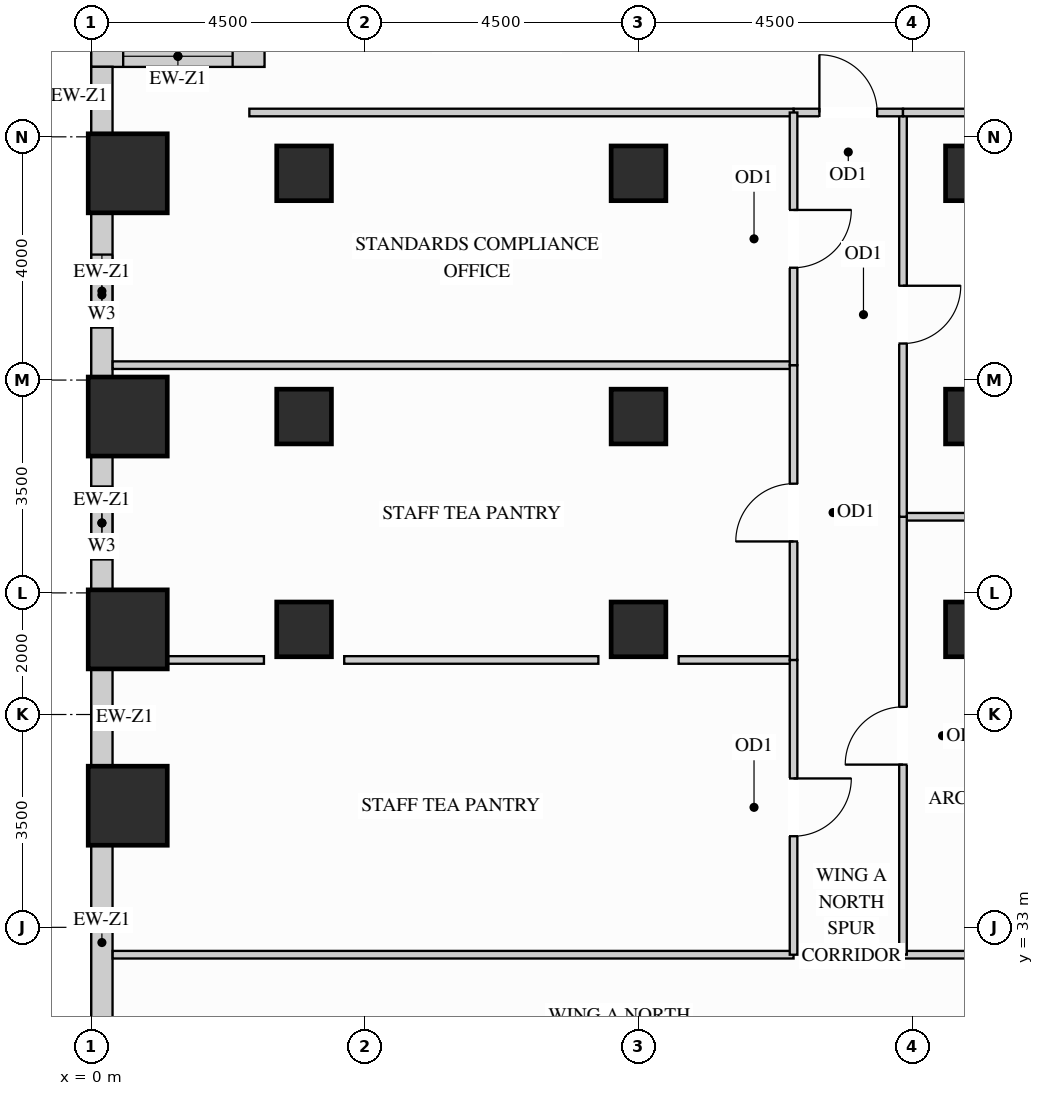
"""IFC4 building model, lengths in metres.
Left out: names, types, materials, properties, quantities, classifications, styles, units other than length and angle.
Written with IfcOpenShell. Run it as: python <this file> out.ifc"""

import sys

from ifc_helpers import new_model, si_unit, direction, frame, frame_2d, origin, origin_2d, place, context, subcontext, project, spatial, rectangle, extrude, source, transform, mapped, element, fill, save


model = new_model("IFC4")
c1 = context("Model", 3, precision=1e-05, world=origin(), true_north=direction((0.0, 1.0)))
c2 = subcontext(c1, "Body", "Model", "MODEL_VIEW")
j1 = project(units=[si_unit("LENGTHUNIT", "METRE"), si_unit("PLANEANGLEUNIT", "RADIAN")], contexts=[c1])
p1 = place(None, origin())
s1 = spatial("IfcSite", under=j1, at=p1, CompositionType="ELEMENT")
p2 = place(p1, origin())
s2 = spatial("IfcBuilding", under=s1, at=p2, CompositionType="ELEMENT")
p3 = place(p2, frame((0.0, 0.0, 47.7)))
s3 = spatial("IfcBuildingStorey", under=s2, at=p3, CompositionType="ELEMENT", Elevation=47.7)
m1 = source(origin(), c2, "Body", "SweptSolid", [
    extrude(rectangle(XDim=0.9, YDim=0.9, at=origin_2d()), origin(), (0.0, 0.0, 1.0), 3.38),
])
for number, where, z_axis, x_axis in (
    (1, (14.5, 37.9, 0.0), (0.0, 0.0, 1.0), (1.0, 0.0, 0.0)),
    (2, (14.5, 41.4, 0.0), (0.0, 0.0, 1.0), (1.0, 0.0, 0.0)),
    (3, (14.5, 45.4, 0.0), (0.0, 0.0, 1.0), (1.0, 0.0, 0.0)),
    (4, (3.5, 37.9, 0.0), (0.0, 0.0, 1.0), (1.0, 0.0, 0.0)),
    (5, (3.5, 41.4, 0.0), (0.0, 0.0, 1.0), (1.0, 0.0, 0.0)),
    (6, (3.5, 45.4, 0.0), (0.0, 0.0, 1.0), (1.0, 0.0, 0.0)),
    (7, (9.0, 37.9, 0.0), (0.0, 0.0, 1.0), (1.0, 0.0, 0.0)),
    (8, (9.0, 41.4, 0.0), (0.0, 0.0, 1.0), (1.0, 0.0, 0.0)),
    (9, (9.0, 45.4, 0.0), (0.0, 0.0, 1.0), (1.0, 0.0, 0.0)),
):
    element("IfcColumn", number, at=place(p3, frame(where, z_axis=z_axis, x_axis=x_axis)), inside=s3, PredefinedType="COLUMN", context=c2, shape_type="MappedRepresentation", body=[
        mapped(m1, transform((0.0, 0.0, 0.0), x_axis=(1.0, 0.0, 0.0), y_axis=(0.0, 1.0, 0.0), z_axis=(0.0, 0.0, 1.0))),
    ])
m2 = source(origin(), c2, "Body", "SweptSolid", [
    extrude(rectangle(XDim=1.3, YDim=1.3, at=origin_2d()), origin(), (0.0, 0.0, 1.0), 3.38),
])
for number, where, z_axis, x_axis in (
    (10, (0.6, 35.0, 0.0), (0.0, 0.0, 1.0), (1.0, 0.0, 0.0)),
    (11, (0.6, 37.9, 0.0), (0.0, 0.0, 1.0), (1.0, 0.0, 0.0)),
    (12, (0.6, 41.4, 0.0), (0.0, 0.0, 1.0), (1.0, 0.0, 0.0)),
    (13, (0.6, 45.4, 0.0), (0.0, 0.0, 1.0), (1.0, 0.0, 0.0)),
):
    element("IfcColumn", number, at=place(p3, frame(where, z_axis=z_axis, x_axis=x_axis)), inside=s3, PredefinedType="COLUMN", context=c2, shape_type="MappedRepresentation", body=[
        mapped(m2, transform((0.0, 0.0, 0.0), x_axis=(1.0, 0.0, 0.0), y_axis=(0.0, 1.0, 0.0), z_axis=(0.0, 0.0, 1.0))),
    ])
p4 = place(p3, frame((2.85, 47.325, 0.0), z_axis=(0.0, 0.0, 1.0), x_axis=(-1.0, 0.0, 0.0)))
e14 = element("IfcWall", 14, at=p4, inside=s3, PredefinedType="SOLIDWALL", context=c2, shape_type="SweptSolid", body=[
    extrude(rectangle(XDim=2.85, YDim=0.35, at=frame_2d((1.425, 0.0))), origin(), (0.0, 0.0, 1.0), 3.365),
])
p5 = place(p4, frame((0.525, 0.0, 0.78)))
e15 = element("IfcOpeningElement", 15, at=p5, cuts=e14, PredefinedType="OPENING", context=c2, shape_type="SweptSolid", body=[
    extrude(rectangle(XDim=1.8, YDim=2.1, at=frame_2d((0.9, 1.05))), frame((0.0, 0.185, 0.0), z_axis=(0.0, -1.0, 0.0), x_axis=(1.0, 0.0, 0.0)), (0.0, 0.0, 1.0), 0.37),
])
m3 = source(origin(), c2, "Body", "SweptSolid", [
    extrude(rectangle(XDim=1.104, YDim=0.35, at=frame_2d((0.552, 0.0))), origin(), (0.0, 0.0, 1.0), 3.365),
])
p6 = place(p3, frame((0.175, 47.152, 0.0), z_axis=(0.0, 0.0, 1.0), x_axis=(0.0, -1.0, 0.0)))
e16 = element("IfcWall", 16, at=p6, inside=s3, PredefinedType="SOLIDWALL", context=c2, shape_type="MappedRepresentation", body=[
    mapped(m3, transform((0.0, 0.0, 0.0), x_axis=(1.0, 0.0, 0.0), y_axis=(0.0, 1.0, 0.0), z_axis=(0.0, 0.0, 1.0))),
])
p7 = place(p3, frame((0.175, 44.752, 0.0), z_axis=(0.0, 0.0, 1.0), x_axis=(0.0, -1.0, 0.0)))
e17 = element("IfcWall", 17, at=p7, inside=s3, PredefinedType="SOLIDWALL", context=c2, shape_type="SweptSolid", body=[
    extrude(rectangle(XDim=2.704, YDim=0.35, at=frame_2d((1.352, 0.0))), origin(), (0.0, 0.0, 1.0), 2.51),
])
p8 = place(p7, frame((0.688, 0.0, 0.78)))
e18 = element("IfcOpeningElement", 18, at=p8, cuts=e17, PredefinedType="OPENING", context=c2, shape_type="SweptSolid", body=[
    extrude(rectangle(XDim=1.2, YDim=1.55, at=frame_2d((0.6, 0.775))), frame((0.0, 0.185, 0.0), z_axis=(0.0, -1.0, 0.0), x_axis=(1.0, 0.0, 0.0)), (0.0, 0.0, 1.0), 0.37),
])
p9 = place(p3, frame((0.175, 40.752, 0.0), z_axis=(0.0, 0.0, 1.0), x_axis=(0.0, -1.0, 0.0)))
e19 = element("IfcWall", 19, at=p9, inside=s3, PredefinedType="SOLIDWALL", context=c2, shape_type="SweptSolid", body=[
    extrude(rectangle(XDim=2.204, YDim=0.35, at=frame_2d((1.102, 0.0))), origin(), (0.0, 0.0, 1.0), 2.51),
])
p10 = place(p9, frame((0.502, 0.0, 0.78)))
e20 = element("IfcOpeningElement", 20, at=p10, cuts=e19, PredefinedType="OPENING", context=c2, shape_type="SweptSolid", body=[
    extrude(rectangle(XDim=1.2, YDim=1.55, at=frame_2d((0.6, 0.775))), frame((0.0, 0.185, 0.0), z_axis=(0.0, -1.0, 0.0), x_axis=(1.0, 0.0, 0.0)), (0.0, 0.0, 1.0), 0.37),
])
m4 = source(origin(), c2, "Body", "SweptSolid", [
    extrude(rectangle(XDim=1.604, YDim=0.35, at=frame_2d((0.802, 0.0))), origin(), (0.0, 0.0, 1.0), 2.51),
])
p11 = place(p3, frame((0.175, 37.252, 0.0), z_axis=(0.0, 0.0, 1.0), x_axis=(0.0, -1.0, 0.0)))
e21 = element("IfcWall", 21, at=p11, inside=s3, PredefinedType="SOLIDWALL", context=c2, shape_type="MappedRepresentation", body=[
    mapped(m4, transform((0.0, 0.0, 0.0), x_axis=(1.0, 0.0, 0.0), y_axis=(0.0, 1.0, 0.0), z_axis=(0.0, 0.0, 1.0))),
])
m5 = source(origin(), c2, "Body", "SweptSolid", [
    extrude(rectangle(XDim=3.204, YDim=0.35, at=frame_2d((1.602, 0.0))), origin(), (0.0, 0.0, 1.0), 2.51),
])
p12 = place(p3, frame((0.175, 34.352, 0.0), z_axis=(0.0, 0.0, 1.0), x_axis=(0.0, -1.0, 0.0)))
e22 = element("IfcWall", 22, at=p12, inside=s3, PredefinedType="SOLIDWALL", context=c2, shape_type="MappedRepresentation", body=[
    mapped(m5, transform((0.0, 0.0, 0.0), x_axis=(1.0, 0.0, 0.0), y_axis=(0.0, 1.0, 0.0), z_axis=(0.0, 0.0, 1.0))),
])
m6 = source(origin(), c2, "Body", "SweptSolid", [
    extrude(rectangle(XDim=5.798, YDim=0.125, at=frame_2d((2.899, 0.0))), origin(), (0.0, 0.0, 1.0), 2.828),
])
p13 = place(p3, frame((13.35, 39.752, 0.0), z_axis=(0.0, 0.0, 1.0), x_axis=(1.0, 0.0, 0.0)))
e23 = element("IfcWall", 23, at=p13, inside=s3, PredefinedType="PARTITIONING", context=c2, shape_type="MappedRepresentation", body=[
    mapped(m6, transform((0.0, 0.0, 0.0), x_axis=(1.0, 0.0, 0.0), y_axis=(0.0, 1.0, 0.0), z_axis=(0.0, 0.0, 1.0))),
])
m7 = source(origin(), c2, "Body", "SweptSolid", [
    extrude(rectangle(XDim=5.798, YDim=0.125, at=frame_2d((2.899, 0.0))), origin(), (0.0, 0.0, 1.0), 3.365),
])
p14 = place(p3, frame((13.35, 32.55, 0.0), z_axis=(0.0, 0.0, 1.0), x_axis=(1.0, 0.0, 0.0)))
e24 = element("IfcWall", 24, at=p14, inside=s3, PredefinedType="PARTITIONING", context=c2, shape_type="MappedRepresentation", body=[
    mapped(m7, transform((0.0, 0.0, 0.0), x_axis=(1.0, 0.0, 0.0), y_axis=(0.0, 1.0, 0.0), z_axis=(0.0, 0.0, 1.0))),
])
m8 = source(origin(), c2, "Body", "SweptSolid", [
    extrude(rectangle(XDim=11.198, YDim=0.125, at=frame_2d((5.599, 0.0))), origin(), (0.0, 0.0, 1.0), 3.365),
])
p15 = place(p3, frame((0.352, 32.55, 0.0), z_axis=(0.0, 0.0, 1.0), x_axis=(1.0, 0.0, 0.0)))
e25 = element("IfcWall", 25, at=p15, inside=s3, PredefinedType="PARTITIONING", context=c2, shape_type="MappedRepresentation", body=[
    mapped(m8, transform((0.0, 0.0, 0.0), x_axis=(1.0, 0.0, 0.0), y_axis=(0.0, 1.0, 0.0), z_axis=(0.0, 0.0, 1.0))),
])
m9 = source(origin(), c2, "Body", "SweptSolid", [
    extrude(rectangle(XDim=1.58, YDim=0.125, at=frame_2d((0.79, 0.0))), origin(), (0.0, 0.0, 1.0), 3.365),
])
p16 = place(p3, frame((1.26, 37.397, 0.0), z_axis=(0.0, 0.0, 1.0), x_axis=(1.0, 0.0, 0.0)))
e26 = element("IfcWall", 26, at=p16, inside=s3, PredefinedType="PARTITIONING", context=c2, shape_type="MappedRepresentation", body=[
    mapped(m9, transform((0.0, 0.0, 0.0), x_axis=(1.0, 0.0, 0.0), y_axis=(0.0, 1.0, 0.0), z_axis=(0.0, 0.0, 1.0))),
])
m10 = source(origin(), c2, "Body", "SweptSolid", [
    extrude(rectangle(XDim=4.18, YDim=0.125, at=frame_2d((2.09, 0.0))), origin(), (0.0, 0.0, 1.0), 3.365),
])
p17 = place(p3, frame((4.16, 37.397, 0.0), z_axis=(0.0, 0.0, 1.0), x_axis=(1.0, 0.0, 0.0)))
e27 = element("IfcWall", 27, at=p17, inside=s3, PredefinedType="PARTITIONING", context=c2, shape_type="MappedRepresentation", body=[
    mapped(m10, transform((0.0, 0.0, 0.0), x_axis=(1.0, 0.0, 0.0), y_axis=(0.0, 1.0, 0.0), z_axis=(0.0, 0.0, 1.0))),
])
m11 = source(origin(), c2, "Body", "SweptSolid", [
    extrude(rectangle(XDim=1.89, YDim=0.125, at=frame_2d((0.945, 0.0))), origin(), (0.0, 0.0, 1.0), 3.365),
])
p18 = place(p3, frame((9.66, 37.397, 0.0), z_axis=(0.0, 0.0, 1.0), x_axis=(1.0, 0.0, 0.0)))
e28 = element("IfcWall", 28, at=p18, inside=s3, PredefinedType="PARTITIONING", context=c2, shape_type="MappedRepresentation", body=[
    mapped(m11, transform((0.0, 0.0, 0.0), x_axis=(1.0, 0.0, 0.0), y_axis=(0.0, 1.0, 0.0), z_axis=(0.0, 0.0, 1.0))),
])
p19 = place(p3, frame((0.352, 42.245, 0.0), z_axis=(0.0, 0.0, 1.0), x_axis=(1.0, 0.0, 0.0)))
e29 = element("IfcWall", 29, at=p19, inside=s3, PredefinedType="PARTITIONING", context=c2, shape_type="MappedRepresentation", body=[
    mapped(m8, transform((0.0, 0.0, 0.0), x_axis=(1.0, 0.0, 0.0), y_axis=(0.0, 1.0, 0.0), z_axis=(0.0, 0.0, 1.0))),
])
p20 = place(p3, frame((13.35, 32.55, 0.0), z_axis=(0.0, 0.0, 1.0), x_axis=(0.0, 1.0, 0.0)))
e30 = element("IfcWall", 30, at=p20, inside=s3, PredefinedType="PARTITIONING", context=c2, shape_type="SweptSolid", body=[
    extrude(rectangle(XDim=7.202, YDim=0.125, at=frame_2d((3.601, 0.0))), origin(), (0.0, 0.0, 1.0), 3.365),
])
p21 = place(p20, frame((3.126, 0.0, 0.0)))
e31 = element("IfcOpeningElement", 31, at=p21, cuts=e30, PredefinedType="OPENING", context=c2, shape_type="SweptSolid", body=[
    extrude(rectangle(XDim=0.95, YDim=2.15, at=frame_2d((0.475, 1.075))), frame((0.0, 0.073, 0.0), z_axis=(0.0, -1.0, 0.0), x_axis=(1.0, 0.0, 0.0)), (0.0, 0.0, 1.0), 0.145),
])
p22 = place(p3, frame((13.35, 39.752, 0.0), z_axis=(0.0, 0.0, 1.0), x_axis=(0.0, 1.0, 0.0)))
e32 = element("IfcWall", 32, at=p22, inside=s3, PredefinedType="PARTITIONING", context=c2, shape_type="SweptSolid", body=[
    extrude(rectangle(XDim=6.648, YDim=0.125, at=frame_2d((3.324, 0.0))), origin(), (0.0, 0.0, 1.0), 3.365),
])
p23 = place(p22, frame((2.849, 0.0, 0.0)))
e33 = element("IfcOpeningElement", 33, at=p23, cuts=e32, PredefinedType="OPENING", context=c2, shape_type="SweptSolid", body=[
    extrude(rectangle(XDim=0.95, YDim=2.15, at=frame_2d((0.475, 1.075))), frame((0.0, 0.073, 0.0), z_axis=(0.0, -1.0, 0.0), x_axis=(1.0, 0.0, 0.0)), (0.0, 0.0, 1.0), 0.145),
])
p24 = place(p3, frame((11.55, 46.4, 0.0), z_axis=(0.0, 0.0, 1.0), x_axis=(1.0, 0.0, 0.0)))
e34 = element("IfcWall", 34, at=p24, inside=s3, PredefinedType="PARTITIONING", context=c2, shape_type="SweptSolid", body=[
    extrude(rectangle(XDim=1.8, YDim=0.125, at=frame_2d((0.9, 0.0))), origin(), (0.0, 0.0, 1.0), 3.365),
])
p25 = place(p24, frame((0.425, 0.0, 0.0)))
e35 = element("IfcOpeningElement", 35, at=p25, cuts=e34, PredefinedType="OPENING", context=c2, shape_type="SweptSolid", body=[
    extrude(rectangle(XDim=0.95, YDim=2.15, at=frame_2d((0.475, 1.075))), frame((0.0, 0.073, 0.0), z_axis=(0.0, -1.0, 0.0), x_axis=(1.0, 0.0, 0.0)), (0.0, 0.0, 1.0), 0.145),
])
m12 = source(origin(), c2, "Body", "SweptSolid", [
    extrude(rectangle(XDim=3.55, YDim=0.125, at=frame_2d((1.775, 0.0))), origin(), (0.0, 0.0, 1.0), 3.365),
])
p26 = place(p3, frame((13.35, 46.4, 0.0), z_axis=(0.0, 0.0, 1.0), x_axis=(1.0, 0.0, 0.0)))
e36 = element("IfcWall", 36, at=p26, inside=s3, PredefinedType="PARTITIONING", context=c2, shape_type="MappedRepresentation", body=[
    mapped(m12, transform((0.0, 0.0, 0.0), x_axis=(1.0, 0.0, 0.0), y_axis=(0.0, 1.0, 0.0), z_axis=(0.0, 0.0, 1.0))),
])
m13 = source(origin(), c2, "Body", "SweptSolid", [
    extrude(rectangle(XDim=8.95, YDim=0.125, at=frame_2d((4.475, 0.0))), origin(), (0.0, 0.0, 1.0), 3.365),
])
p27 = place(p3, frame((2.6, 46.4, 0.0), z_axis=(0.0, 0.0, 1.0), x_axis=(1.0, 0.0, 0.0)))
e37 = element("IfcWall", 37, at=p27, inside=s3, PredefinedType="PARTITIONING", context=c2, shape_type="MappedRepresentation", body=[
    mapped(m13, transform((0.0, 0.0, 0.0), x_axis=(1.0, 0.0, 0.0), y_axis=(0.0, 1.0, 0.0), z_axis=(0.0, 0.0, 1.0))),
])
p28 = place(p3, frame((11.55, 32.55, 0.0), z_axis=(0.0, 0.0, 1.0), x_axis=(0.0, 1.0, 0.0)))
e38 = element("IfcWall", 38, at=p28, inside=s3, PredefinedType="PARTITIONING", context=c2, shape_type="SweptSolid", body=[
    extrude(rectangle(XDim=4.847, YDim=0.125, at=frame_2d((2.423, 0.0))), origin(), (0.0, 0.0, 1.0), 3.365),
])
p29 = place(p28, frame((1.948, 0.0, 0.0)))
e39 = element("IfcOpeningElement", 39, at=p29, cuts=e38, PredefinedType="OPENING", context=c2, shape_type="SweptSolid", body=[
    extrude(rectangle(XDim=0.95, YDim=2.15, at=frame_2d((0.475, 1.075))), frame((0.0, 0.073, 0.0), z_axis=(0.0, -1.0, 0.0), x_axis=(1.0, 0.0, 0.0)), (0.0, 0.0, 1.0), 0.145),
])
p30 = place(p3, frame((11.55, 37.397, 0.0), z_axis=(0.0, 0.0, 1.0), x_axis=(0.0, 1.0, 0.0)))
e40 = element("IfcWall", 40, at=p30, inside=s3, PredefinedType="PARTITIONING", context=c2, shape_type="SweptSolid", body=[
    extrude(rectangle(XDim=4.848, YDim=0.125, at=frame_2d((2.424, 0.0))), origin(), (0.0, 0.0, 1.0), 3.365),
])
p31 = place(p30, frame((1.949, 0.0, 0.0)))
e41 = element("IfcOpeningElement", 41, at=p31, cuts=e40, PredefinedType="OPENING", context=c2, shape_type="SweptSolid", body=[
    extrude(rectangle(XDim=0.95, YDim=2.15, at=frame_2d((0.475, 1.075))), frame((0.0, 0.073, 0.0), z_axis=(0.0, -1.0, 0.0), x_axis=(1.0, 0.0, 0.0)), (0.0, 0.0, 1.0), 0.145),
])
p32 = place(p3, frame((11.55, 42.245, 0.0), z_axis=(0.0, 0.0, 1.0), x_axis=(0.0, 1.0, 0.0)))
e42 = element("IfcWall", 42, at=p32, inside=s3, PredefinedType="PARTITIONING", context=c2, shape_type="SweptSolid", body=[
    extrude(rectangle(XDim=4.155, YDim=0.125, at=frame_2d((2.077, 0.0))), origin(), (0.0, 0.0, 1.0), 3.365),
])
p33 = place(p32, frame((1.603, 0.0, 0.0)))
e43 = element("IfcOpeningElement", 43, at=p33, cuts=e42, PredefinedType="OPENING", context=c2, shape_type="SweptSolid", body=[
    extrude(rectangle(XDim=0.95, YDim=2.15, at=frame_2d((0.475, 1.075))), frame((0.0, 0.073, 0.0), z_axis=(0.0, -1.0, 0.0), x_axis=(1.0, 0.0, 0.0)), (0.0, 0.0, 1.0), 0.145),
])
m14 = source(origin(), c2, "Body", "SweptSolid", [
    extrude(rectangle(XDim=0.95, YDim=2.15, at=frame_2d((0.475, 1.075))), frame((0.0, 0.025, 0.0), z_axis=(0.0, -1.0, 0.0), x_axis=(1.0, 0.0, 0.0)), (0.0, 0.0, 1.0), 0.05),
])
p34 = place(p21, origin())
e44 = element("IfcDoor", 44, at=p34, inside=s3, OperationType="SINGLE_SWING_LEFT", PredefinedType="DOOR", context=c2, shape_type="MappedRepresentation", body=[
    mapped(m14, transform((0.0, 0.0, 0.0), x_axis=(1.0, 0.0, 0.0), y_axis=(0.0, 1.0, 0.0), z_axis=(0.0, 0.0, 1.0))),
])
fill(e31, e44)
p35 = place(p23, origin())
e45 = element("IfcDoor", 45, at=p35, inside=s3, OperationType="SINGLE_SWING_RIGHT", PredefinedType="DOOR", context=c2, shape_type="MappedRepresentation", body=[
    mapped(m14, transform((0.0, 0.0, 0.0), x_axis=(1.0, 0.0, 0.0), y_axis=(0.0, 1.0, 0.0), z_axis=(0.0, 0.0, 1.0))),
])
fill(e33, e45)
p36 = place(p25, origin())
e46 = element("IfcDoor", 46, at=p36, inside=s3, OperationType="SINGLE_SWING_LEFT", PredefinedType="DOOR", context=c2, shape_type="MappedRepresentation", body=[
    mapped(m14, transform((0.0, 0.0, 0.0), x_axis=(1.0, 0.0, 0.0), y_axis=(0.0, 1.0, 0.0), z_axis=(0.0, 0.0, 1.0))),
])
fill(e35, e46)
p37 = place(p29, origin())
e47 = element("IfcDoor", 47, at=p37, inside=s3, OperationType="SINGLE_SWING_RIGHT", PredefinedType="DOOR", context=c2, shape_type="MappedRepresentation", body=[
    mapped(m14, transform((0.0, 0.0, 0.0), x_axis=(1.0, 0.0, 0.0), y_axis=(0.0, 1.0, 0.0), z_axis=(0.0, 0.0, 1.0))),
])
fill(e39, e47)
p38 = place(p31, origin())
e48 = element("IfcDoor", 48, at=p38, inside=s3, OperationType="SINGLE_SWING_LEFT", PredefinedType="DOOR", context=c2, shape_type="MappedRepresentation", body=[
    mapped(m14, transform((0.0, 0.0, 0.0), x_axis=(1.0, 0.0, 0.0), y_axis=(0.0, 1.0, 0.0), z_axis=(0.0, 0.0, 1.0))),
])
fill(e41, e48)
p39 = place(p33, origin())
e49 = element("IfcDoor", 49, at=p39, inside=s3, OperationType="SINGLE_SWING_RIGHT", PredefinedType="DOOR", context=c2, shape_type="MappedRepresentation", body=[
    mapped(m14, transform((0.0, 0.0, 0.0), x_axis=(1.0, 0.0, 0.0), y_axis=(0.0, 1.0, 0.0), z_axis=(0.0, 0.0, 1.0))),
])
fill(e43, e49)
m15 = source(origin(), c2, "Body", "SweptSolid", [
    extrude(rectangle(XDim=1.8, YDim=2.1, at=frame_2d((0.9, 1.05))), frame((0.0, 0.03, 0.0), z_axis=(0.0, -1.0, 0.0), x_axis=(1.0, 0.0, 0.0)), (0.0, 0.0, 1.0), 0.06),
])
p40 = place(p5, origin())
e50 = element("IfcWindow", 50, at=p40, inside=s3, PartitioningType="SINGLE_PANEL", PredefinedType="WINDOW", context=c2, shape_type="MappedRepresentation", body=[
    mapped(m15, transform((0.0, 0.0, 0.0), x_axis=(1.0, 0.0, 0.0), y_axis=(0.0, 1.0, 0.0), z_axis=(0.0, 0.0, 1.0))),
])
fill(e15, e50)
m16 = source(origin(), c2, "Body", "SweptSolid", [
    extrude(rectangle(XDim=1.2, YDim=1.55, at=frame_2d((0.6, 0.775))), frame((0.0, 0.03, 0.0), z_axis=(0.0, -1.0, 0.0), x_axis=(1.0, 0.0, 0.0)), (0.0, 0.0, 1.0), 0.06),
])
p41 = place(p8, origin())
e51 = element("IfcWindow", 51, at=p41, inside=s3, PartitioningType="SINGLE_PANEL", PredefinedType="WINDOW", context=c2, shape_type="MappedRepresentation", body=[
    mapped(m16, transform((0.0, 0.0, 0.0), x_axis=(1.0, 0.0, 0.0), y_axis=(0.0, 1.0, 0.0), z_axis=(0.0, 0.0, 1.0))),
])
fill(e18, e51)
p42 = place(p10, origin())
e52 = element("IfcWindow", 52, at=p42, inside=s3, PartitioningType="SINGLE_PANEL", PredefinedType="WINDOW", context=c2, shape_type="MappedRepresentation", body=[
    mapped(m16, transform((0.0, 0.0, 0.0), x_axis=(1.0, 0.0, 0.0), y_axis=(0.0, 1.0, 0.0), z_axis=(0.0, 0.0, 1.0))),
])
fill(e20, e52)
save(model, sys.argv[1])
